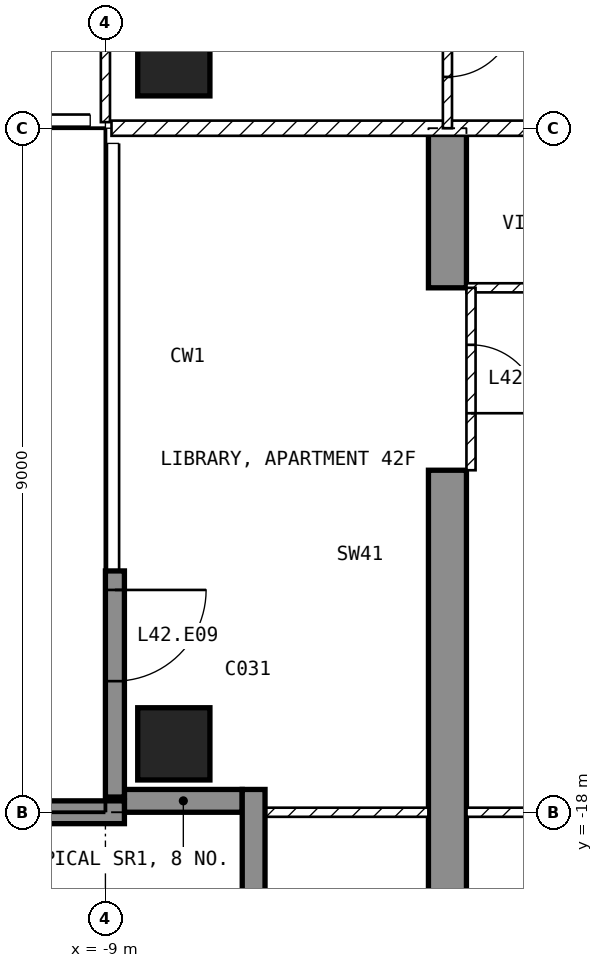
"""IFC4 building model, lengths in metres.
Left out: names, types, materials, properties, quantities, classifications, styles, units other than length and angle.
Written with IfcOpenShell. Run it as: python <this file> out.ifc"""

import sys

from ifc_helpers import new_model, si_unit, direction, frame, frame_2d, origin, origin_2d, place, context, subcontext, project, spatial, polyline, rectangle, outline, extrude, element, fill, save


model = new_model("IFC4")
c1 = context("Model", 3, precision=1e-05, world=origin(), true_north=direction((0.0, 1.0)))
c2 = subcontext(c1, "Body", "Model", "MODEL_VIEW")
j1 = project(units=[si_unit("LENGTHUNIT", "METRE"), si_unit("PLANEANGLEUNIT", "RADIAN")], contexts=[c1])
p1 = place(None, origin())
s1 = spatial("IfcSite", under=j1, at=p1, CompositionType="ELEMENT")
p2 = place(p1, origin())
s2 = spatial("IfcBuilding", under=s1, at=p2, CompositionType="ELEMENT")
p3 = place(p2, frame((0.0, 0.0, 173.6)))
s3 = spatial("IfcBuildingStorey", under=s2, at=p3, CompositionType="ELEMENT", Elevation=173.6)
for number, where, z_axis, x_axis in (
    (1, (-8.1, -17.1, -0.25), (0.0, 0.0, 1.0), (1.0, 0.0, 0.0)),
    (2, (-8.1, -8.1, -0.25), (0.0, 0.0, 1.0), (1.0, 0.0, 0.0)),
):
    element("IfcColumn", number, at=place(p3, frame(where, z_axis=z_axis, x_axis=x_axis)), inside=s3, PredefinedType="COLUMN", context=c2, shape_type="SweptSolid", body=[
        extrude(rectangle(XDim=0.95, YDim=0.95, at=origin_2d()), origin(), (0.0, 0.0, 1.0), 3.5),
    ])
p4 = place(p3, frame((-4.75, -20.225, -0.25), z_axis=(1.0, 0.0, 0.0), x_axis=(0.0, 1.0, 0.0)))
e3 = element("IfcWall", 3, at=p4, inside=s3, PredefinedType="SHEAR", context=c2, shape_type="SweptSolid", body=[
    extrude(outline(polyline([(0.0, 0.0), (6.725, 0.0), (6.725, 2.65), (9.125, 2.65), (9.125, 0.0), (11.225, 0.0), (11.225, 3.5), (0.0, 3.5), (0.0, 0.0)])), origin(), (0.0, 0.0, 1.0), 0.5),
])
p5 = place(p3, frame((-8.875, -14.825, 0.0), z_axis=(0.0, 0.0, 1.0), x_axis=(0.0, -1.0, 0.0)))
e4 = element("IfcWall", 4, at=p5, inside=s3, PredefinedType="SOLIDWALL", context=c2, shape_type="SweptSolid", body=[
    extrude(rectangle(XDim=2.975, YDim=0.25, at=frame_2d((1.488, 0.0))), origin(), (0.0, 0.0, 1.0), 3.25),
])
p6 = place(p5, frame((0.25, 0.0, 0.0)))
e5 = element("IfcOpeningElement", 5, at=p6, cuts=e4, PredefinedType="OPENING", context=c2, shape_type="SweptSolid", body=[
    extrude(rectangle(XDim=1.2, YDim=2.4, at=frame_2d((0.6, 1.2))), frame((0.0, 0.135, 0.0), z_axis=(0.0, -1.0, 0.0), x_axis=(1.0, 0.0, 0.0)), (0.0, 0.0, 1.0), 0.27),
])
p7 = place(p3, frame((-8.75, -17.85, 0.0), z_axis=(0.0, 0.0, 1.0), x_axis=(1.0, 0.0, 0.0)))
e6 = element("IfcWall", 6, at=p7, inside=s3, PredefinedType="SOLIDWALL", context=c2, shape_type="SweptSolid", body=[
    extrude(rectangle(XDim=1.55, YDim=0.3, at=frame_2d((0.775, 0.0))), origin(), (0.0, 0.0, 1.0), 3.25),
])
p8 = place(p3, frame((-7.05, -17.7, 0.0), z_axis=(0.0, 0.0, 1.0), x_axis=(0.0, -1.0, 0.0)))
e7 = element("IfcWall", 7, at=p8, inside=s3, PredefinedType="SOLIDWALL", context=c2, shape_type="SweptSolid", body=[
    extrude(rectangle(XDim=1.8, YDim=0.3, at=frame_2d((0.9, 0.0))), origin(), (0.0, 0.0, 1.0), 3.25),
])
p9 = place(p3, frame((-8.75, -18.0, 0.0), z_axis=(0.0, 0.0, 1.0), x_axis=(-1.0, 0.0, 0.0)))
e8 = element("IfcWall", 8, at=p9, inside=s3, PredefinedType="SOLIDWALL", context=c2, shape_type="SweptSolid", body=[
    extrude(rectangle(XDim=2.95, YDim=0.3, at=frame_2d((1.475, 0.0))), origin(), (0.0, 0.0, 1.0), 3.25),
])
p10 = place(p3, frame((8.92, -9.0, 0.0), z_axis=(0.0, 0.0, 1.0), x_axis=(-1.0, 0.0, 0.0)))
e9 = element("IfcWall", 9, at=p10, inside=s3, PredefinedType="PARTITIONING", context=c2, shape_type="SweptSolid", body=[
    extrude(rectangle(XDim=17.84, YDim=0.2, at=frame_2d((8.92, 0.0))), origin(), (0.0, 0.0, 1.0), 3.25),
])
p11 = place(p10, frame((8.42, 0.0, 0.0)))
e10 = element("IfcOpeningElement", 10, at=p11, cuts=e9, PredefinedType="OPENING", context=c2, shape_type="SweptSolid", body=[
    extrude(rectangle(XDim=1.0, YDim=2.1, at=frame_2d((0.5, 1.05))), frame((0.0, 0.11, 0.0), z_axis=(0.0, -1.0, 0.0), x_axis=(1.0, 0.0, 0.0)), (0.0, 0.0, 1.0), 0.22),
])
p12 = place(p3, frame((-9.0, -1.3, 0.0), z_axis=(0.0, 0.0, 1.0), x_axis=(0.0, -1.0, 0.0)))
e11 = element("IfcWall", 11, at=p12, inside=s3, PredefinedType="PARTITIONING", context=c2, shape_type="SweptSolid", body=[
    extrude(rectangle(XDim=7.62, YDim=0.12, at=frame_2d((3.81, 0.0))), origin(), (0.0, 0.0, 1.0), 3.25),
])
p13 = place(p12, frame((4.3, 0.0, 0.0)))
e12 = element("IfcOpeningElement", 12, at=p13, cuts=e11, PredefinedType="OPENING", context=c2, shape_type="SweptSolid", body=[
    extrude(rectangle(XDim=0.9, YDim=2.1, at=frame_2d((0.45, 1.05))), frame((0.0, 0.07, 0.0), z_axis=(0.0, -1.0, 0.0), x_axis=(1.0, 0.0, 0.0)), (0.0, 0.0, 1.0), 0.14),
])
p14 = place(p3, frame((-4.5, -6.75, 0.0), z_axis=(0.0, 0.0, 1.0), x_axis=(0.0, -1.0, 0.0)))
e13 = element("IfcWall", 13, at=p14, inside=s3, PredefinedType="PARTITIONING", context=c2, shape_type="SweptSolid", body=[
    extrude(rectangle(XDim=2.25, YDim=0.12, at=frame_2d((1.125, 0.0))), origin(), (0.0, 0.0, 1.0), 3.25),
])
p15 = place(p14, frame((0.675, 0.0, 0.0)))
e14 = element("IfcOpeningElement", 14, at=p15, cuts=e13, PredefinedType="OPENING", context=c2, shape_type="SweptSolid", body=[
    extrude(rectangle(XDim=0.9, YDim=2.1, at=frame_2d((0.45, 1.05))), frame((0.0, 0.07, 0.0), z_axis=(0.0, -1.0, 0.0), x_axis=(1.0, 0.0, 0.0)), (0.0, 0.0, 1.0), 0.14),
])
p16 = place(p3, frame((2.1, -11.1, 0.0), z_axis=(0.0, 0.0, 1.0), x_axis=(-1.0, 0.0, 0.0)))
e15 = element("IfcWall", 15, at=p16, inside=s3, PredefinedType="PARTITIONING", context=c2, shape_type="SweptSolid", body=[
    extrude(rectangle(XDim=6.35, YDim=0.12, at=frame_2d((3.175, 0.0))), origin(), (0.0, 0.0, 1.0), 3.25),
])
p17 = place(p16, frame((2.725, 0.0, 0.0)))
e16 = element("IfcOpeningElement", 16, at=p17, cuts=e15, PredefinedType="OPENING", context=c2, shape_type="SweptSolid", body=[
    extrude(rectangle(XDim=0.9, YDim=2.1, at=frame_2d((0.45, 1.05))), frame((0.0, 0.07, 0.0), z_axis=(0.0, -1.0, 0.0), x_axis=(1.0, 0.0, 0.0)), (0.0, 0.0, 1.0), 0.14),
])
p18 = place(p3, frame((4.25, -18.0, 0.0), z_axis=(0.0, 0.0, 1.0), x_axis=(-1.0, 0.0, 0.0)))
e17 = element("IfcWall", 17, at=p18, inside=s3, PredefinedType="PARTITIONING", context=c2, shape_type="SweptSolid", body=[
    extrude(rectangle(XDim=8.5, YDim=0.12, at=frame_2d((4.25, 0.0))), origin(), (0.0, 0.0, 1.0), 3.25),
])
p19 = place(p18, frame((5.675, 0.0, 0.0)))
e18 = element("IfcOpeningElement", 18, at=p19, cuts=e17, PredefinedType="OPENING", context=c2, shape_type="SweptSolid", body=[
    extrude(rectangle(XDim=0.9, YDim=2.1, at=frame_2d((0.45, 1.05))), frame((0.0, 0.07, 0.0), z_axis=(0.0, -1.0, 0.0), x_axis=(1.0, 0.0, 0.0)), (0.0, 0.0, 1.0), 0.14),
])
p20 = place(p3, frame((-4.75, -18.0, 0.0), z_axis=(0.0, 0.0, 1.0), x_axis=(-1.0, 0.0, 0.0)))
e19 = element("IfcWall", 19, at=p20, inside=s3, PredefinedType="PARTITIONING", context=c2, shape_type="SweptSolid", body=[
    extrude(rectangle(XDim=2.37, YDim=0.12, at=frame_2d((1.185, 0.0))), origin(), (0.0, 0.0, 1.0), 3.25),
])
p21 = place(p3, frame((-4.19, -11.1, 0.0), z_axis=(0.0, 0.0, 1.0), x_axis=(0.0, -1.0, 0.0)))
e20 = element("IfcWall", 20, at=p21, inside=s3, PredefinedType="PARTITIONING", context=c2, shape_type="SweptSolid", body=[
    extrude(rectangle(XDim=2.4, YDim=0.12, at=frame_2d((1.2, 0.0))), origin(), (0.0, 0.0, 1.0), 2.4),
])
p22 = place(p21, frame((0.75, 0.0, 0.0)))
e21 = element("IfcOpeningElement", 21, at=p22, cuts=e20, PredefinedType="OPENING", context=c2, shape_type="SweptSolid", body=[
    extrude(rectangle(XDim=0.9, YDim=2.1, at=frame_2d((0.45, 1.05))), frame((0.0, 0.07, 0.0), z_axis=(0.0, -1.0, 0.0), x_axis=(1.0, 0.0, 0.0)), (0.0, 0.0, 1.0), 0.14),
])
p23 = place(p6, origin())
e22 = element("IfcDoor", 22, at=p23, inside=s3, OperationType="SINGLE_SWING_LEFT", PredefinedType="DOOR", context=c2, shape_type="SweptSolid", body=[
    extrude(rectangle(XDim=1.2, YDim=2.4, at=frame_2d((0.6, 1.2))), frame((0.0, 0.025, 0.0), z_axis=(0.0, -1.0, 0.0), x_axis=(1.0, 0.0, 0.0)), (0.0, 0.0, 1.0), 0.05),
])
fill(e5, e22)
p24 = place(p15, origin())
e23 = element("IfcDoor", 23, at=p24, inside=s3, OperationType="SINGLE_SWING_LEFT", PredefinedType="DOOR", context=c2, shape_type="SweptSolid", body=[
    extrude(rectangle(XDim=0.9, YDim=2.1, at=frame_2d((0.45, 1.05))), frame((0.0, 0.025, 0.0), z_axis=(0.0, -1.0, 0.0), x_axis=(1.0, 0.0, 0.0)), (0.0, 0.0, 1.0), 0.05),
])
fill(e14, e23)
p25 = place(p22, origin())
e24 = element("IfcDoor", 24, at=p25, inside=s3, OperationType="SINGLE_SWING_RIGHT", PredefinedType="DOOR", context=c2, shape_type="SweptSolid", body=[
    extrude(rectangle(XDim=0.9, YDim=2.1, at=frame_2d((0.45, 1.05))), frame((0.0, 0.025, 0.0), z_axis=(0.0, -1.0, 0.0), x_axis=(1.0, 0.0, 0.0)), (0.0, 0.0, 1.0), 0.05),
])
fill(e21, e24)
save(model, sys.argv[1])
